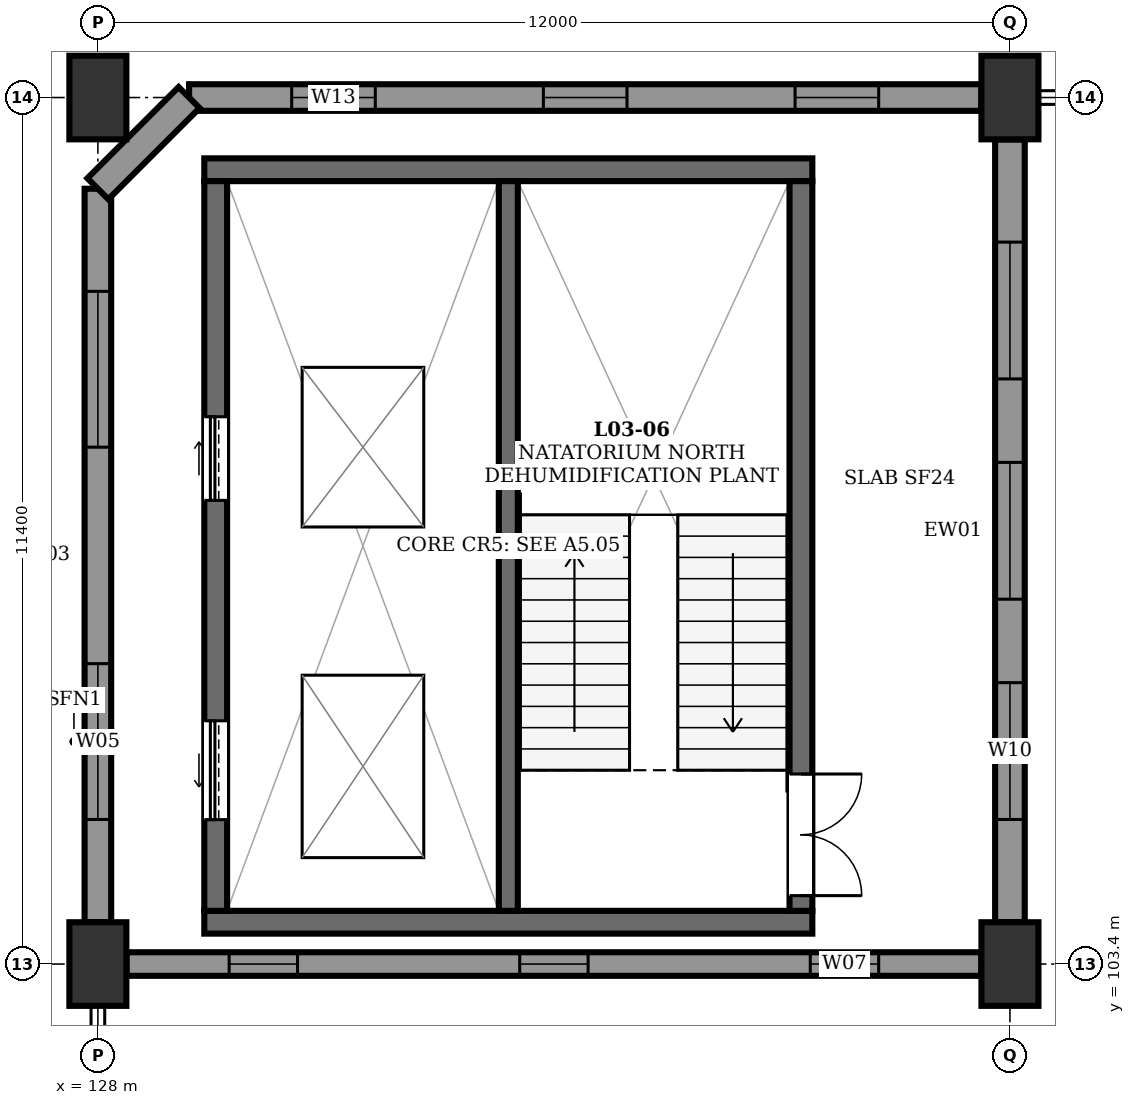
"""IFC4 building model, lengths in metres.
Left out: names, types, materials, properties, quantities, classifications, styles, units other than length and angle.
Written with IfcOpenShell. Run it as: python <this file> out.ifc"""

import sys

from ifc_helpers import new_model, si_unit, direction, frame, frame_2d, origin, origin_2d, place, context, subcontext, project, spatial, rectangle, extrude, element, fill, save


model = new_model("IFC4")
c1 = context("Model", 3, precision=1e-05, world=origin(), true_north=direction((0.0, 1.0)))
c2 = subcontext(c1, "Body", "Model", "MODEL_VIEW")
j1 = project(units=[si_unit("LENGTHUNIT", "METRE"), si_unit("PLANEANGLEUNIT", "RADIAN")], contexts=[c1])
p1 = place(None, origin())
s1 = spatial("IfcSite", under=j1, at=p1, CompositionType="ELEMENT")
p2 = place(p1, origin())
s2 = spatial("IfcBuilding", under=s1, at=p2, CompositionType="ELEMENT")
p3 = place(p2, frame((0.0, 0.0, 14.7)))
s3 = spatial("IfcBuildingStorey", under=s2, at=p3, CompositionType="ELEMENT", Elevation=14.7)
for number, where, z_axis, x_axis in (
    (1, (128.0, 103.4, 0.0), (0.0, 0.0, 1.0), (1.0, 0.0, 0.0)),
    (2, (128.0, 114.8, 0.0), (0.0, 0.0, 1.0), (1.0, 0.0, 0.0)),
    (3, (140.0, 103.4, 0.0), (0.0, 0.0, 1.0), (1.0, 0.0, 0.0)),
    (4, (140.0, 114.8, 0.0), (0.0, 0.0, 1.0), (1.0, 0.0, 0.0)),
):
    element("IfcColumn", number, at=place(p3, frame(where, z_axis=z_axis, x_axis=x_axis)), inside=s3, PredefinedType="COLUMN", context=c2, shape_type="SweptSolid", body=[
        extrude(rectangle(XDim=0.75, YDim=1.1, at=origin_2d()), origin(), (0.0, 0.0, 1.0), 4.5),
    ])
p4 = place(p3, frame((128.0, 103.952, 0.0), z_axis=(0.0, 0.0, 1.0), x_axis=(0.0, 1.0, 0.0)))
e5 = element("IfcWall", 5, at=p4, inside=s3, PredefinedType="STANDARD", context=c2, shape_type="SweptSolid", body=[
    extrude(rectangle(XDim=9.648, YDim=0.35, at=frame_2d((4.824, 0.0))), origin(), (0.0, 0.0, 1.0), 3.712),
])
p5 = place(p4, frame((1.35, 0.0, 0.75)))
e6 = element("IfcOpeningElement", 6, at=p5, cuts=e5, PredefinedType="OPENING", context=c2, shape_type="SweptSolid", body=[
    extrude(rectangle(XDim=2.05, YDim=1.75, at=frame_2d((1.025, 0.875))), frame((0.0, 0.187, 0.0), z_axis=(0.0, -1.0, 0.0), x_axis=(1.0, 0.0, 0.0)), (0.0, 0.0, 1.0), 0.374),
])
p6 = place(p4, frame((6.248, 0.0, 0.75)))
e7 = element("IfcOpeningElement", 7, at=p6, cuts=e5, PredefinedType="OPENING", context=c2, shape_type="SweptSolid", body=[
    extrude(rectangle(XDim=2.05, YDim=1.75, at=frame_2d((1.025, 0.875))), frame((0.0, 0.187, 0.0), z_axis=(0.0, -1.0, 0.0), x_axis=(1.0, 0.0, 0.0)), (0.0, 0.0, 1.0), 0.374),
])
p7 = place(p3, frame((128.377, 103.4, 0.0), z_axis=(0.0, 0.0, 1.0), x_axis=(1.0, 0.0, 0.0)))
e8 = element("IfcWall", 8, at=p7, inside=s3, PredefinedType="STANDARD", context=c2, shape_type="SweptSolid", body=[
    extrude(rectangle(XDim=11.246, YDim=0.31, at=frame_2d((5.623, 0.0))), origin(), (0.0, 0.0, 1.0), 3.345),
])
p8 = place(p7, frame((1.35, 0.0, 0.75)))
e9 = element("IfcOpeningElement", 9, at=p8, cuts=e8, PredefinedType="OPENING", context=c2, shape_type="SweptSolid", body=[
    extrude(rectangle(XDim=0.9, YDim=2.05, at=frame_2d((0.45, 1.025))), frame((0.0, 0.167, 0.0), z_axis=(0.0, -1.0, 0.0), x_axis=(1.0, 0.0, 0.0)), (0.0, 0.0, 1.0), 0.334),
])
p9 = place(p7, frame((5.173, 0.0, 0.75)))
e10 = element("IfcOpeningElement", 10, at=p9, cuts=e8, PredefinedType="OPENING", context=c2, shape_type="SweptSolid", body=[
    extrude(rectangle(XDim=0.9, YDim=2.05, at=frame_2d((0.45, 1.025))), frame((0.0, 0.167, 0.0), z_axis=(0.0, -1.0, 0.0), x_axis=(1.0, 0.0, 0.0)), (0.0, 0.0, 1.0), 0.334),
])
p10 = place(p7, frame((8.996, 0.0, 0.75)))
e11 = element("IfcOpeningElement", 11, at=p10, cuts=e8, PredefinedType="OPENING", context=c2, shape_type="SweptSolid", body=[
    extrude(rectangle(XDim=0.9, YDim=2.05, at=frame_2d((0.45, 1.025))), frame((0.0, 0.167, 0.0), z_axis=(0.0, -1.0, 0.0), x_axis=(1.0, 0.0, 0.0)), (0.0, 0.0, 1.0), 0.334),
])
p11 = place(p3, frame((140.0, 103.952, 0.0), z_axis=(0.0, 0.0, 1.0), x_axis=(0.0, 1.0, 0.0)))
e12 = element("IfcWall", 12, at=p11, inside=s3, PredefinedType="STANDARD", context=c2, shape_type="SweptSolid", body=[
    extrude(rectangle(XDim=10.296, YDim=0.39, at=frame_2d((5.148, 0.0))), origin(), (0.0, 0.0, 1.0), 3.545),
])
p12 = place(p11, frame((1.35, 0.0, 0.75)))
e13 = element("IfcOpeningElement", 13, at=p12, cuts=e12, PredefinedType="OPENING", context=c2, shape_type="SweptSolid", body=[
    extrude(rectangle(XDim=1.8, YDim=2.05, at=frame_2d((0.9, 1.025))), frame((0.0, 0.207, 0.0), z_axis=(0.0, -1.0, 0.0), x_axis=(1.0, 0.0, 0.0)), (0.0, 0.0, 1.0), 0.414),
])
p13 = place(p11, frame((4.248, 0.0, 0.75)))
e14 = element("IfcOpeningElement", 14, at=p13, cuts=e12, PredefinedType="OPENING", context=c2, shape_type="SweptSolid", body=[
    extrude(rectangle(XDim=1.8, YDim=2.05, at=frame_2d((0.9, 1.025))), frame((0.0, 0.207, 0.0), z_axis=(0.0, -1.0, 0.0), x_axis=(1.0, 0.0, 0.0)), (0.0, 0.0, 1.0), 0.414),
])
p14 = place(p11, frame((7.146, 0.0, 0.75)))
e15 = element("IfcOpeningElement", 15, at=p14, cuts=e12, PredefinedType="OPENING", context=c2, shape_type="SweptSolid", body=[
    extrude(rectangle(XDim=1.8, YDim=2.05, at=frame_2d((0.9, 1.025))), frame((0.0, 0.207, 0.0), z_axis=(0.0, -1.0, 0.0), x_axis=(1.0, 0.0, 0.0)), (0.0, 0.0, 1.0), 0.414),
])
p15 = place(p3, frame((129.2, 114.8, 0.0), z_axis=(0.0, 0.0, 1.0), x_axis=(1.0, 0.0, 0.0)))
e16 = element("IfcWall", 16, at=p15, inside=s3, PredefinedType="STANDARD", context=c2, shape_type="SweptSolid", body=[
    extrude(rectangle(XDim=10.423, YDim=0.35, at=frame_2d((5.211, 0.0))), origin(), (0.0, 0.0, 1.0), 3.712),
])
p16 = place(p15, frame((1.35, 0.0, 0.75)))
e17 = element("IfcOpeningElement", 17, at=p16, cuts=e16, PredefinedType="OPENING", context=c2, shape_type="SweptSolid", body=[
    extrude(rectangle(XDim=1.1, YDim=1.25, at=frame_2d((0.55, 0.625))), frame((0.0, 0.187, 0.0), z_axis=(0.0, -1.0, 0.0), x_axis=(1.0, 0.0, 0.0)), (0.0, 0.0, 1.0), 0.374),
])
p17 = place(p15, frame((4.662, 0.0, 0.75)))
e18 = element("IfcOpeningElement", 18, at=p17, cuts=e16, PredefinedType="OPENING", context=c2, shape_type="SweptSolid", body=[
    extrude(rectangle(XDim=1.1, YDim=1.25, at=frame_2d((0.55, 0.625))), frame((0.0, 0.187, 0.0), z_axis=(0.0, -1.0, 0.0), x_axis=(1.0, 0.0, 0.0)), (0.0, 0.0, 1.0), 0.374),
])
p18 = place(p15, frame((7.973, 0.0, 0.75)))
e19 = element("IfcOpeningElement", 19, at=p18, cuts=e16, PredefinedType="OPENING", context=c2, shape_type="SweptSolid", body=[
    extrude(rectangle(XDim=1.1, YDim=1.25, at=frame_2d((0.55, 0.625))), frame((0.0, 0.187, 0.0), z_axis=(0.0, -1.0, 0.0), x_axis=(1.0, 0.0, 0.0)), (0.0, 0.0, 1.0), 0.374),
])
p19 = place(p3, frame((128.0, 113.6, 0.0), z_axis=(0.0, 0.0, 1.0), x_axis=(0.707106781187, 0.707106781187, 0.0)))
e20 = element("IfcWall", 20, at=p19, inside=s3, PredefinedType="STANDARD", context=c2, shape_type="SweptSolid", body=[
    extrude(rectangle(XDim=1.697, YDim=0.39, at=frame_2d((0.849, 0.0))), origin(), (0.0, 0.0, 1.0), 3.712),
])
for number, where, z_axis, x_axis in (
    (21, (129.4, 103.95, 0.0), (0.0, 0.0, 1.0), (1.0, 0.0, 0.0)),
    (22, (129.4, 113.85, 0.0), (0.0, 0.0, 1.0), (1.0, 0.0, 0.0)),
):
    element("IfcWall", number, at=place(p3, frame(where, z_axis=z_axis, x_axis=x_axis)), inside=s3, PredefinedType="SHEAR", context=c2, shape_type="SweptSolid", body=[
        extrude(rectangle(XDim=8.0, YDim=0.3, at=frame_2d((4.0, 0.0))), origin(), (0.0, 0.0, 1.0), 4.26),
    ])
p20 = place(p3, frame((129.55, 104.1, 0.0), z_axis=(0.0, 0.0, 1.0), x_axis=(0.0, 1.0, 0.0)))
e23 = element("IfcWall", 23, at=p20, inside=s3, PredefinedType="SHEAR", context=c2, shape_type="SweptSolid", body=[
    extrude(rectangle(XDim=9.6, YDim=0.3, at=frame_2d((4.8, 0.0))), origin(), (0.0, 0.0, 1.0), 4.26),
])
p21 = place(p20, frame((1.2, 0.0, 0.0)))
e24 = element("IfcOpeningElement", 24, at=p21, cuts=e23, PredefinedType="OPENING", context=c2, shape_type="SweptSolid", body=[
    extrude(rectangle(XDim=1.3, YDim=2.2, at=frame_2d((0.65, 1.1))), frame((0.0, 0.162, 0.0), z_axis=(0.0, -1.0, 0.0), x_axis=(1.0, 0.0, 0.0)), (0.0, 0.0, 1.0), 0.324),
])
p22 = place(p20, frame((5.4, 0.0, 0.0)))
e25 = element("IfcOpeningElement", 25, at=p22, cuts=e23, PredefinedType="OPENING", context=c2, shape_type="SweptSolid", body=[
    extrude(rectangle(XDim=1.1, YDim=2.2, at=frame_2d((0.55, 1.1))), frame((0.0, 0.162, 0.0), z_axis=(0.0, -1.0, 0.0), x_axis=(1.0, 0.0, 0.0)), (0.0, 0.0, 1.0), 0.324),
])
p23 = place(p3, frame((137.25, 104.1, 0.0), z_axis=(0.0, 0.0, 1.0), x_axis=(0.0, 1.0, 0.0)))
e26 = element("IfcWall", 26, at=p23, inside=s3, PredefinedType="SHEAR", context=c2, shape_type="SweptSolid", body=[
    extrude(rectangle(XDim=9.6, YDim=0.3, at=frame_2d((4.8, 0.0))), origin(), (0.0, 0.0, 1.0), 4.26),
])
p24 = place(p23, frame((0.2, 0.0, 0.0)))
e27 = element("IfcOpeningElement", 27, at=p24, cuts=e26, PredefinedType="OPENING", context=c2, shape_type="SweptSolid", body=[
    extrude(rectangle(XDim=1.6, YDim=2.2, at=frame_2d((0.8, 1.1))), frame((0.0, 0.162, 0.0), z_axis=(0.0, -1.0, 0.0), x_axis=(1.0, 0.0, 0.0)), (0.0, 0.0, 1.0), 0.324),
])
p25 = place(p3, frame((133.4, 104.1, 0.0), z_axis=(0.0, 0.0, 1.0), x_axis=(0.0, 1.0, 0.0)))
e28 = element("IfcWall", 28, at=p25, inside=s3, PredefinedType="SHEAR", context=c2, shape_type="SweptSolid", body=[
    extrude(rectangle(XDim=9.6, YDim=0.25, at=frame_2d((4.8, 0.0))), origin(), (0.0, 0.0, 1.0), 4.26),
])
p26 = place(p5, origin())
e29 = element("IfcWindow", 29, at=p26, inside=s3, PartitioningType="TRIPLE_PANEL_VERTICAL", PredefinedType="WINDOW", context=c2, shape_type="SweptSolid", body=[
    extrude(rectangle(XDim=2.05, YDim=1.75, at=frame_2d((1.025, 0.875))), frame((0.0, 0.08, 0.0), z_axis=(0.0, -1.0, 0.0), x_axis=(1.0, 0.0, 0.0)), (0.0, 0.0, 1.0), 0.06),
])
fill(e6, e29)
p27 = place(p6, origin())
e30 = element("IfcWindow", 30, at=p27, inside=s3, PartitioningType="TRIPLE_PANEL_VERTICAL", PredefinedType="WINDOW", context=c2, shape_type="SweptSolid", body=[
    extrude(rectangle(XDim=2.05, YDim=1.75, at=frame_2d((1.025, 0.875))), frame((0.0, 0.08, 0.0), z_axis=(0.0, -1.0, 0.0), x_axis=(1.0, 0.0, 0.0)), (0.0, 0.0, 1.0), 0.06),
])
fill(e7, e30)
p28 = place(p8, origin())
e31 = element("IfcWindow", 31, at=p28, inside=s3, PartitioningType="SINGLE_PANEL", PredefinedType="WINDOW", context=c2, shape_type="SweptSolid", body=[
    extrude(rectangle(XDim=0.9, YDim=2.05, at=frame_2d((0.45, 1.025))), frame((0.0, 0.08, 0.0), z_axis=(0.0, -1.0, 0.0), x_axis=(1.0, 0.0, 0.0)), (0.0, 0.0, 1.0), 0.06),
])
fill(e9, e31)
p29 = place(p9, origin())
e32 = element("IfcWindow", 32, at=p29, inside=s3, PartitioningType="SINGLE_PANEL", PredefinedType="WINDOW", context=c2, shape_type="SweptSolid", body=[
    extrude(rectangle(XDim=0.9, YDim=2.05, at=frame_2d((0.45, 1.025))), frame((0.0, 0.08, 0.0), z_axis=(0.0, -1.0, 0.0), x_axis=(1.0, 0.0, 0.0)), (0.0, 0.0, 1.0), 0.06),
])
fill(e10, e32)
p30 = place(p10, origin())
e33 = element("IfcWindow", 33, at=p30, inside=s3, PartitioningType="SINGLE_PANEL", PredefinedType="WINDOW", context=c2, shape_type="SweptSolid", body=[
    extrude(rectangle(XDim=0.9, YDim=2.05, at=frame_2d((0.45, 1.025))), frame((0.0, 0.08, 0.0), z_axis=(0.0, -1.0, 0.0), x_axis=(1.0, 0.0, 0.0)), (0.0, 0.0, 1.0), 0.06),
])
fill(e11, e33)
p31 = place(p12, origin())
e34 = element("IfcWindow", 34, at=p31, inside=s3, PartitioningType="DOUBLE_PANEL_VERTICAL", PredefinedType="WINDOW", context=c2, shape_type="SweptSolid", body=[
    extrude(rectangle(XDim=1.8, YDim=2.05, at=frame_2d((0.9, 1.025))), frame((0.0, 0.08, 0.0), z_axis=(0.0, -1.0, 0.0), x_axis=(1.0, 0.0, 0.0)), (0.0, 0.0, 1.0), 0.06),
])
fill(e13, e34)
p32 = place(p13, origin())
e35 = element("IfcWindow", 35, at=p32, inside=s3, PartitioningType="DOUBLE_PANEL_VERTICAL", PredefinedType="WINDOW", context=c2, shape_type="SweptSolid", body=[
    extrude(rectangle(XDim=1.8, YDim=2.05, at=frame_2d((0.9, 1.025))), frame((0.0, 0.08, 0.0), z_axis=(0.0, -1.0, 0.0), x_axis=(1.0, 0.0, 0.0)), (0.0, 0.0, 1.0), 0.06),
])
fill(e14, e35)
p33 = place(p14, origin())
e36 = element("IfcWindow", 36, at=p33, inside=s3, PartitioningType="DOUBLE_PANEL_VERTICAL", PredefinedType="WINDOW", context=c2, shape_type="SweptSolid", body=[
    extrude(rectangle(XDim=1.8, YDim=2.05, at=frame_2d((0.9, 1.025))), frame((0.0, 0.08, 0.0), z_axis=(0.0, -1.0, 0.0), x_axis=(1.0, 0.0, 0.0)), (0.0, 0.0, 1.0), 0.06),
])
fill(e15, e36)
p34 = place(p16, origin())
e37 = element("IfcWindow", 37, at=p34, inside=s3, PartitioningType="SINGLE_PANEL", PredefinedType="WINDOW", context=c2, shape_type="SweptSolid", body=[
    extrude(rectangle(XDim=1.1, YDim=1.25, at=frame_2d((0.55, 0.625))), frame((0.0, 0.08, 0.0), z_axis=(0.0, -1.0, 0.0), x_axis=(1.0, 0.0, 0.0)), (0.0, 0.0, 1.0), 0.06),
])
fill(e17, e37)
p35 = place(p17, origin())
e38 = element("IfcWindow", 38, at=p35, inside=s3, PartitioningType="SINGLE_PANEL", PredefinedType="WINDOW", context=c2, shape_type="SweptSolid", body=[
    extrude(rectangle(XDim=1.1, YDim=1.25, at=frame_2d((0.55, 0.625))), frame((0.0, 0.08, 0.0), z_axis=(0.0, -1.0, 0.0), x_axis=(1.0, 0.0, 0.0)), (0.0, 0.0, 1.0), 0.06),
])
fill(e18, e38)
p36 = place(p18, origin())
e39 = element("IfcWindow", 39, at=p36, inside=s3, PartitioningType="SINGLE_PANEL", PredefinedType="WINDOW", context=c2, shape_type="SweptSolid", body=[
    extrude(rectangle(XDim=1.1, YDim=1.25, at=frame_2d((0.55, 0.625))), frame((0.0, 0.08, 0.0), z_axis=(0.0, -1.0, 0.0), x_axis=(1.0, 0.0, 0.0)), (0.0, 0.0, 1.0), 0.06),
])
fill(e19, e39)
p37 = place(p24, frame((1.6, 0.0, 0.0), z_axis=(0.0, 0.0, 1.0), x_axis=(-1.0, 0.0, 0.0)))
e40 = element("IfcDoor", 40, at=p37, inside=s3, OperationType="DOUBLE_DOOR_SINGLE_SWING", PredefinedType="DOOR", context=c2, shape_type="SweptSolid", body=[
    extrude(rectangle(XDim=1.6, YDim=2.2, at=frame_2d((0.8, 1.1))), frame((0.0, 0.025, 0.0), z_axis=(0.0, -1.0, 0.0), x_axis=(1.0, 0.0, 0.0)), (0.0, 0.0, 1.0), 0.05),
])
fill(e27, e40)
p38 = place(p21, origin())
e41 = element("IfcDoor", 41, at=p38, inside=s3, OperationType="SLIDING_TO_LEFT", PredefinedType="DOOR", context=c2, shape_type="SweptSolid", body=[
    extrude(rectangle(XDim=1.3, YDim=2.2, at=frame_2d((0.65, 1.1))), frame((0.0, 0.025, 0.0), z_axis=(0.0, -1.0, 0.0), x_axis=(1.0, 0.0, 0.0)), (0.0, 0.0, 1.0), 0.05),
])
fill(e24, e41)
p39 = place(p22, origin())
e42 = element("IfcDoor", 42, at=p39, inside=s3, OperationType="SLIDING_TO_RIGHT", PredefinedType="DOOR", context=c2, shape_type="SweptSolid", body=[
    extrude(rectangle(XDim=1.1, YDim=2.2, at=frame_2d((0.55, 1.1))), frame((0.0, 0.025, 0.0), z_axis=(0.0, -1.0, 0.0), x_axis=(1.0, 0.0, 0.0)), (0.0, 0.0, 1.0), 0.05),
])
fill(e25, e42)
save(model, sys.argv[1])
